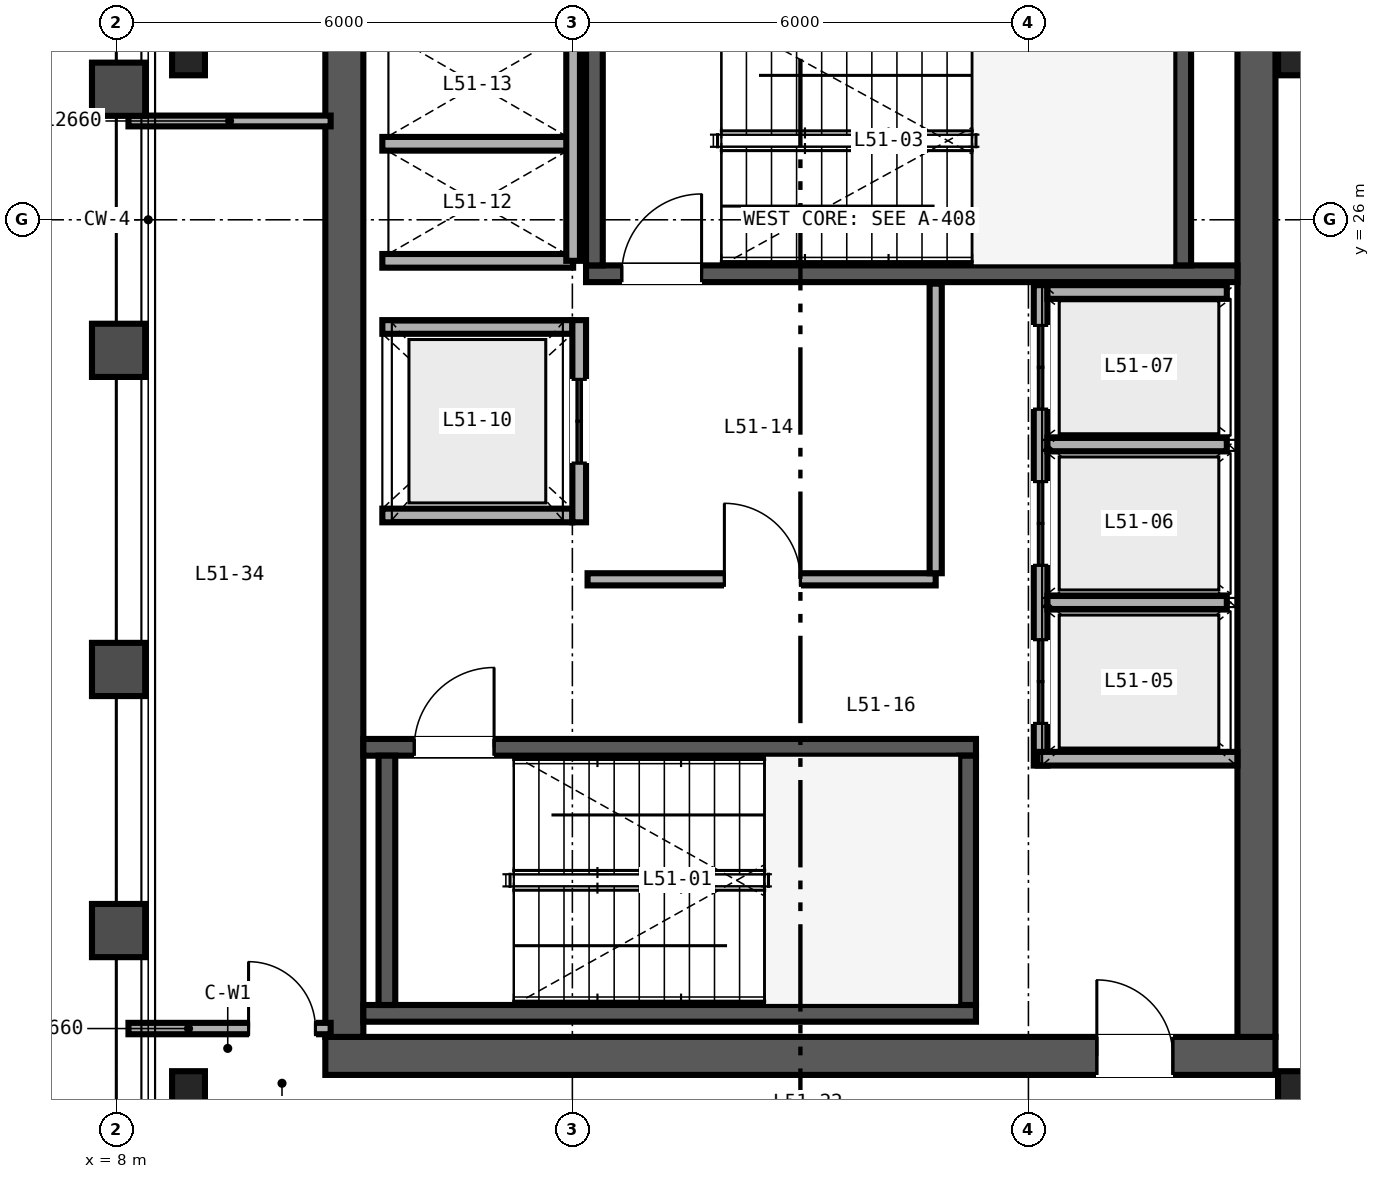
"""IFC4 building model, lengths in metres.
Left out: names, types, materials, properties, quantities, classifications, styles, units other than length and angle.
Written with IfcOpenShell. Run it as: python <this file> out.ifc"""

import sys

from ifc_helpers import new_model, si_unit, direction, frame, frame_2d, origin, origin_2d, place, context, subcontext, project, spatial, rectangle, i_section, extrude, source, transform, mapped, element, fill, save


model = new_model("IFC4")
c1 = context("Model", 3, precision=1e-05, world=origin(), true_north=direction((0.0, 1.0)))
c2 = subcontext(c1, "Body", "Model", "MODEL_VIEW")
j1 = project(units=[si_unit("LENGTHUNIT", "METRE"), si_unit("PLANEANGLEUNIT", "RADIAN")], contexts=[c1])
p1 = place(None, origin())
s1 = spatial("IfcSite", under=j1, at=p1, CompositionType="ELEMENT")
p2 = place(p1, origin())
s2 = spatial("IfcBuilding", under=s1, at=p2, CompositionType="ELEMENT")
p3 = place(p2, frame((0.0, 0.0, 202.8)))
s3 = spatial("IfcBuildingStorey", under=s2, at=p3, CompositionType="ELEMENT", Elevation=202.8)
p4 = place(p3, frame((10.75, 15.0, 0.0), z_axis=(0.0, 0.0, 1.0), x_axis=(1.0, 0.0, 0.0)))
e1 = element("IfcWall", 1, at=p4, inside=s3, PredefinedType="SHEAR", context=c2, shape_type="SweptSolid", body=[
    extrude(rectangle(XDim=12.5, YDim=0.5, at=frame_2d((6.25, 0.0))), origin(), (0.0, 0.0, 1.0), 3.37),
])
p5 = place(p4, frame((10.15, 0.0, 0.0)))
e2 = element("IfcOpeningElement", 2, at=p5, cuts=e1, PredefinedType="OPENING", context=c2, shape_type="SweptSolid", body=[
    extrude(rectangle(XDim=1.0, YDim=2.15, at=frame_2d((0.5, 1.075))), frame((0.0, 0.26, 0.0), z_axis=(0.0, -1.0, 0.0), x_axis=(1.0, 0.0, 0.0)), (0.0, 0.0, 1.0), 0.52),
])
for number, where, z_axis, x_axis in (
    (3, (11.0, 15.25, 0.0), (0.0, 0.0, 1.0), (0.0, 1.0, 0.0)),
    (4, (23.0, 15.25, 0.0), (0.0, 0.0, 1.0), (0.0, 1.0, 0.0)),
):
    element("IfcWall", number, at=place(p3, frame(where, z_axis=z_axis, x_axis=x_axis)), inside=s3, PredefinedType="SHEAR", context=c2, shape_type="SweptSolid", body=[
        extrude(rectangle(XDim=21.5, YDim=0.5, at=frame_2d((10.75, 0.0))), origin(), (0.0, 0.0, 1.0), 3.37),
    ])
p6 = place(p3, frame((11.25, 15.56, 0.0), z_axis=(0.0, 0.0, 1.0), x_axis=(1.0, 0.0, 0.0)))
e5 = element("IfcWall", 5, at=p6, inside=s3, PredefinedType="SHEAR", context=c2, shape_type="SweptSolid", body=[
    extrude(rectangle(XDim=8.06, YDim=0.22, at=frame_2d((4.03, 0.0))), origin(), (0.0, 0.0, 1.0), 3.4),
])
p7 = place(p3, frame((11.25, 19.06, 0.0), z_axis=(0.0, 0.0, 1.0), x_axis=(1.0, 0.0, 0.0)))
e6 = element("IfcWall", 6, at=p7, inside=s3, PredefinedType="SHEAR", context=c2, shape_type="SweptSolid", body=[
    extrude(rectangle(XDim=8.06, YDim=0.22, at=frame_2d((4.03, 0.0))), origin(), (0.0, 0.0, 1.0), 3.4),
])
p8 = place(p7, frame((0.67, 0.0, 0.0)))
e7 = element("IfcOpeningElement", 7, at=p8, cuts=e6, PredefinedType="OPENING", context=c2, shape_type="SweptSolid", body=[
    extrude(rectangle(XDim=1.05, YDim=2.15, at=frame_2d((0.525, 1.075))), frame((0.0, 0.12, 0.0), z_axis=(0.0, -1.0, 0.0), x_axis=(1.0, 0.0, 0.0)), (0.0, 0.0, 1.0), 0.24),
])
for number, where, z_axis, x_axis in (
    (8, (11.56, 15.67, 0.0), (0.0, 0.0, 1.0), (0.0, 1.0, 0.0)),
    (9, (19.2, 15.67, 0.0), (0.0, 0.0, 1.0), (0.0, 1.0, 0.0)),
):
    element("IfcWall", number, at=place(p3, frame(where, z_axis=z_axis, x_axis=x_axis)), inside=s3, PredefinedType="SHEAR", context=c2, shape_type="SweptSolid", body=[
        extrude(rectangle(XDim=3.28, YDim=0.22, at=frame_2d((1.64, 0.0))), origin(), (0.0, 0.0, 1.0), 3.4),
    ])
p9 = place(p3, frame((14.18, 25.29, 0.0), z_axis=(0.0, 0.0, 1.0), x_axis=(1.0, 0.0, 0.0)))
e10 = element("IfcWall", 10, at=p9, inside=s3, PredefinedType="SHEAR", context=c2, shape_type="SweptSolid", body=[
    extrude(rectangle(XDim=8.57, YDim=0.22, at=frame_2d((4.285, 0.0))), origin(), (0.0, 0.0, 1.0), 3.4),
])
p10 = place(p9, frame((0.47, 0.0, 0.0)))
e11 = element("IfcOpeningElement", 11, at=p10, cuts=e10, PredefinedType="OPENING", context=c2, shape_type="SweptSolid", body=[
    extrude(rectangle(XDim=1.05, YDim=2.15, at=frame_2d((0.525, 1.075))), frame((0.0, 0.12, 0.0), z_axis=(0.0, -1.0, 0.0), x_axis=(1.0, 0.0, 0.0)), (0.0, 0.0, 1.0), 0.24),
])
for number, where, z_axis, x_axis in (
    (12, (14.29, 25.4, 0.0), (0.0, 0.0, 1.0), (0.0, 1.0, 0.0)),
    (13, (22.03, 25.4, 0.0), (0.0, 0.0, 1.0), (0.0, 1.0, 0.0)),
):
    element("IfcWall", number, at=place(p3, frame(where, z_axis=z_axis, x_axis=x_axis)), inside=s3, PredefinedType="SHEAR", context=c2, shape_type="SweptSolid", body=[
        extrude(rectangle(XDim=3.28, YDim=0.22, at=frame_2d((1.64, 0.0))), origin(), (0.0, 0.0, 1.0), 3.4),
    ])
m1 = source(origin(), c2, "Body", "SweptSolid", [
    extrude(i_section(OverallWidth=0.432, OverallDepth=0.498, WebThickness=0.056, FlangeThickness=0.089, FilletRadius=0.025, at=origin_2d()), origin(), (0.0, 0.0, 1.0), 3.37),
])
for number, where, z_axis, x_axis in (
    (14, (8.95, 14.55, 0.0), (0.0, 0.0, 1.0), (1.0, 0.0, 0.0)),
    (15, (23.5, 14.55, 0.0), (0.0, 0.0, 1.0), (1.0, 0.0, 0.0)),
    (16, (8.95, 28.15, 0.0), (0.0, 0.0, 1.0), (1.0, 0.0, 0.0)),
    (17, (23.5, 28.15, 0.0), (0.0, 0.0, 1.0), (1.0, 0.0, 0.0)),
):
    element("IfcColumn", number, at=place(p3, frame(where, z_axis=z_axis, x_axis=x_axis)), inside=s3, PredefinedType="COLUMN", context=c2, shape_type="MappedRepresentation", body=[
        mapped(m1, transform((0.0, 0.0, 0.0), scale=1.0)),
    ])
p11 = place(p3, frame((20.16, 18.82, 0.0), z_axis=(0.0, 0.0, 1.0), x_axis=(0.0, 1.0, 0.0)))
e18 = element("IfcWall", 18, at=p11, inside=s3, PredefinedType="SOLIDWALL", context=c2, shape_type="SweptSolid", body=[
    extrude(rectangle(XDim=6.32, YDim=0.18, at=frame_2d((3.16, 0.0))), origin(), (0.0, 0.0, 1.0), 2.47),
])
p12 = place(p11, frame((0.555, 0.0, 0.0)))
e19 = element("IfcOpeningElement", 19, at=p12, cuts=e18, PredefinedType="OPENING", context=c2, shape_type="SweptSolid", body=[
    extrude(rectangle(XDim=1.1, YDim=2.2, at=frame_2d((0.55, 1.1))), frame((0.0, 0.1, 0.0), z_axis=(0.0, -1.0, 0.0), x_axis=(1.0, 0.0, 0.0)), (0.0, 0.0, 1.0), 0.2),
])
p13 = place(p11, frame((2.635, 0.0, 0.0)))
e20 = element("IfcOpeningElement", 20, at=p13, cuts=e18, PredefinedType="OPENING", context=c2, shape_type="SweptSolid", body=[
    extrude(rectangle(XDim=1.1, YDim=2.2, at=frame_2d((0.55, 1.1))), frame((0.0, 0.1, 0.0), z_axis=(0.0, -1.0, 0.0), x_axis=(1.0, 0.0, 0.0)), (0.0, 0.0, 1.0), 0.2),
])
p14 = place(p11, frame((4.69, 0.0, 0.0)))
e21 = element("IfcOpeningElement", 21, at=p14, cuts=e18, PredefinedType="OPENING", context=c2, shape_type="SweptSolid", body=[
    extrude(rectangle(XDim=1.1, YDim=2.2, at=frame_2d((0.55, 1.1))), frame((0.0, 0.1, 0.0), z_axis=(0.0, -1.0, 0.0), x_axis=(1.0, 0.0, 0.0)), (0.0, 0.0, 1.0), 0.2),
])
p15 = place(p3, frame((20.12, 18.91, 0.0), z_axis=(0.0, 0.0, 1.0), x_axis=(1.0, 0.0, 0.0)))
e22 = element("IfcWall", 22, at=p15, inside=s3, PredefinedType="SOLIDWALL", context=c2, shape_type="SweptSolid", body=[
    extrude(rectangle(XDim=2.63, YDim=0.18, at=frame_2d((1.315, 0.0))), origin(), (0.0, 0.0, 1.0), 3.37),
])
p16 = place(p3, frame((20.25, 25.05, 0.0), z_axis=(0.0, 0.0, 1.0), x_axis=(1.0, 0.0, 0.0)))
e23 = element("IfcWall", 23, at=p16, inside=s3, PredefinedType="SOLIDWALL", context=c2, shape_type="SweptSolid", body=[
    extrude(rectangle(XDim=2.36, YDim=0.18, at=frame_2d((1.18, 0.0))), origin(), (0.0, 0.0, 1.0), 3.37),
])
p17 = place(p3, frame((20.25, 20.965, 0.0), z_axis=(0.0, 0.0, 1.0), x_axis=(1.0, 0.0, 0.0)))
e24 = element("IfcWall", 24, at=p17, inside=s3, PredefinedType="SOLIDWALL", context=c2, shape_type="SweptSolid", body=[
    extrude(rectangle(XDim=2.36, YDim=0.18, at=frame_2d((1.18, 0.0))), origin(), (0.0, 0.0, 1.0), 2.47),
])
p18 = place(p3, frame((20.25, 23.045, 0.0), z_axis=(0.0, 0.0, 1.0), x_axis=(1.0, 0.0, 0.0)))
e25 = element("IfcWall", 25, at=p18, inside=s3, PredefinedType="SOLIDWALL", context=c2, shape_type="SweptSolid", body=[
    extrude(rectangle(XDim=2.36, YDim=0.18, at=frame_2d((1.18, 0.0))), origin(), (0.0, 0.0, 1.0), 3.37),
])
for number, where, z_axis, x_axis in (
    (26, (11.5, 22.11, 0.0), (0.0, 0.0, 1.0), (1.0, 0.0, 0.0)),
    (27, (11.5, 24.59, 0.0), (0.0, 0.0, 1.0), (1.0, 0.0, 0.0)),
):
    element("IfcWall", number, at=place(p3, frame(where, z_axis=z_axis, x_axis=x_axis)), inside=s3, PredefinedType="SOLIDWALL", context=c2, shape_type="SweptSolid", body=[
        extrude(rectangle(XDim=2.5, YDim=0.18, at=frame_2d((1.25, 0.0))), origin(), (0.0, 0.0, 1.0), 3.37),
    ])
p19 = place(p3, frame((14.09, 22.02, 0.0), z_axis=(0.0, 0.0, 1.0), x_axis=(0.0, 1.0, 0.0)))
e28 = element("IfcWall", 28, at=p19, inside=s3, PredefinedType="SOLIDWALL", context=c2, shape_type="SweptSolid", body=[
    extrude(rectangle(XDim=2.66, YDim=0.18, at=frame_2d((1.33, 0.0))), origin(), (0.0, 0.0, 1.0), 3.37),
])
p20 = place(p19, frame((0.78, 0.0, 0.0)))
e29 = element("IfcOpeningElement", 29, at=p20, cuts=e28, PredefinedType="OPENING", context=c2, shape_type="SweptSolid", body=[
    extrude(rectangle(XDim=1.1, YDim=2.2, at=frame_2d((0.55, 1.1))), frame((0.0, 0.1, 0.0), z_axis=(0.0, -1.0, 0.0), x_axis=(1.0, 0.0, 0.0)), (0.0, 0.0, 1.0), 0.2),
])
for number, where, z_axis, x_axis in (
    (30, (11.5, 25.46, 0.0), (0.0, 0.0, 1.0), (1.0, 0.0, 0.0)),
    (31, (11.5, 27.0, 0.0), (0.0, 0.0, 1.0), (1.0, 0.0, 0.0)),
):
    element("IfcWall", number, at=place(p3, frame(where, z_axis=z_axis, x_axis=x_axis)), inside=s3, PredefinedType="SOLIDWALL", context=c2, shape_type="SweptSolid", body=[
        extrude(rectangle(XDim=2.51, YDim=0.18, at=frame_2d((1.255, 0.0))), origin(), (0.0, 0.0, 1.0), 3.37),
    ])
p21 = place(p3, frame((14.01, 25.46, 0.0), z_axis=(0.0, 0.0, 1.0), x_axis=(0.0, 1.0, 0.0)))
e32 = element("IfcWall", 32, at=p21, inside=s3, PredefinedType="SOLIDWALL", context=c2, shape_type="SweptSolid", body=[
    extrude(rectangle(XDim=3.08, YDim=0.18, at=frame_2d((1.54, 0.0))), origin(), (0.0, 0.0, 1.0), 3.37),
])
p22 = place(p3, frame((14.2, 21.27, 0.0), z_axis=(0.0, 0.0, 1.0), x_axis=(1.0, 0.0, 0.0)))
e33 = element("IfcWall", 33, at=p22, inside=s3, PredefinedType="PARTITIONING", context=c2, shape_type="SweptSolid", body=[
    extrude(rectangle(XDim=4.58, YDim=0.16, at=frame_2d((2.29, 0.0))), origin(), (0.0, 0.0, 1.0), 3.37),
])
p23 = place(p22, frame((1.8, 0.0, 0.0)))
e34 = element("IfcOpeningElement", 34, at=p23, cuts=e33, PredefinedType="OPENING", context=c2, shape_type="SweptSolid", body=[
    extrude(rectangle(XDim=1.0, YDim=2.15, at=frame_2d((0.5, 1.075))), frame((0.0, 0.09, 0.0), z_axis=(0.0, -1.0, 0.0), x_axis=(1.0, 0.0, 0.0)), (0.0, 0.0, 1.0), 0.18),
])
p24 = place(p3, frame((18.78, 21.35, 0.0), z_axis=(0.0, 0.0, 1.0), x_axis=(0.0, 1.0, 0.0)))
e35 = element("IfcWall", 35, at=p24, inside=s3, PredefinedType="PARTITIONING", context=c2, shape_type="SweptSolid", body=[
    extrude(rectangle(XDim=3.81, YDim=0.16, at=frame_2d((1.905, 0.0))), origin(), (0.0, 0.0, 1.0), 3.37),
])
p25 = place(p3, frame((8.16, 15.36, 0.0), z_axis=(0.0, 0.0, 1.0), x_axis=(1.0, 0.0, 0.0)))
e36 = element("IfcWall", 36, at=p25, inside=s3, PredefinedType="PARTITIONING", context=c2, shape_type="SweptSolid", body=[
    extrude(rectangle(XDim=2.66, YDim=0.15, at=frame_2d((1.33, 0.0))), origin(), (0.0, 0.0, 1.0), 2.591),
])
p26 = place(p25, frame((1.58, 0.0, 0.0)))
e37 = element("IfcOpeningElement", 37, at=p26, cuts=e36, PredefinedType="OPENING", context=c2, shape_type="SweptSolid", body=[
    extrude(rectangle(XDim=0.88, YDim=2.15, at=frame_2d((0.44, 1.075))), frame((0.0, 0.085, 0.0), z_axis=(0.0, -1.0, 0.0), x_axis=(1.0, 0.0, 0.0)), (0.0, 0.0, 1.0), 0.17),
])
p27 = place(p3, frame((8.16, 27.3, 0.0), z_axis=(0.0, 0.0, 1.0), x_axis=(1.0, 0.0, 0.0)))
e38 = element("IfcWall", 38, at=p27, inside=s3, PredefinedType="PARTITIONING", context=c2, shape_type="SweptSolid", body=[
    extrude(rectangle(XDim=2.66, YDim=0.142, at=frame_2d((1.33, 0.0))), origin(), (0.0, 0.0, 1.0), 2.591),
])
m2 = source(origin(), c2, "Body", "SweptSolid", [
    extrude(rectangle(XDim=1.05, YDim=2.15, at=frame_2d((0.525, 1.075))), frame((0.0, 0.025, 0.0), z_axis=(0.0, -1.0, 0.0), x_axis=(1.0, 0.0, 0.0)), (0.0, 0.0, 1.0), 0.05),
])
p28 = place(p8, origin())
e39 = element("IfcDoor", 39, at=p28, inside=s3, OperationType="SINGLE_SWING_RIGHT", PredefinedType="DOOR", context=c2, shape_type="MappedRepresentation", body=[
    mapped(m2, transform((0.0, 0.0, 0.0), scale=1.0)),
])
fill(e7, e39)
p29 = place(p10, origin())
e40 = element("IfcDoor", 40, at=p29, inside=s3, OperationType="SINGLE_SWING_RIGHT", PredefinedType="DOOR", context=c2, shape_type="MappedRepresentation", body=[
    mapped(m2, transform((0.0, 0.0, 0.0), scale=1.0)),
])
fill(e11, e40)
m3 = source(origin(), c2, "Body", "SweptSolid", [
    extrude(rectangle(XDim=1.1, YDim=2.2, at=frame_2d((0.55, 1.1))), frame((0.0, 0.025, 0.0), z_axis=(0.0, -1.0, 0.0), x_axis=(1.0, 0.0, 0.0)), (0.0, 0.0, 1.0), 0.05),
])
p30 = place(p12, origin())
e41 = element("IfcDoor", 41, at=p30, inside=s3, OperationType="DOUBLE_DOOR_SLIDING", PredefinedType="DOOR", context=c2, shape_type="MappedRepresentation", body=[
    mapped(m3, transform((0.0, 0.0, 0.0), scale=1.0)),
])
fill(e19, e41)
p31 = place(p13, origin())
e42 = element("IfcDoor", 42, at=p31, inside=s3, OperationType="DOUBLE_DOOR_SLIDING", PredefinedType="DOOR", context=c2, shape_type="MappedRepresentation", body=[
    mapped(m3, transform((0.0, 0.0, 0.0), scale=1.0)),
])
fill(e20, e42)
p32 = place(p14, origin())
e43 = element("IfcDoor", 43, at=p32, inside=s3, OperationType="DOUBLE_DOOR_SLIDING", PredefinedType="DOOR", context=c2, shape_type="MappedRepresentation", body=[
    mapped(m3, transform((0.0, 0.0, 0.0), scale=1.0)),
])
fill(e21, e43)
p33 = place(p20, origin())
e44 = element("IfcDoor", 44, at=p33, inside=s3, OperationType="DOUBLE_DOOR_SLIDING", PredefinedType="DOOR", context=c2, shape_type="MappedRepresentation", body=[
    mapped(m3, transform((0.0, 0.0, 0.0), scale=1.0)),
])
fill(e29, e44)
m4 = source(origin(), c2, "Body", "SweptSolid", [
    extrude(rectangle(XDim=1.0, YDim=2.15, at=frame_2d((0.5, 1.075))), frame((0.0, 0.025, 0.0), z_axis=(0.0, -1.0, 0.0), x_axis=(1.0, 0.0, 0.0)), (0.0, 0.0, 1.0), 0.05),
])
p34 = place(p23, origin())
e45 = element("IfcDoor", 45, at=p34, inside=s3, OperationType="SINGLE_SWING_LEFT", PredefinedType="DOOR", context=c2, shape_type="MappedRepresentation", body=[
    mapped(m4, transform((0.0, 0.0, 0.0), scale=1.0)),
])
fill(e34, e45)
p35 = place(p5, origin())
e46 = element("IfcDoor", 46, at=p35, inside=s3, OperationType="SINGLE_SWING_LEFT", PredefinedType="DOOR", context=c2, shape_type="MappedRepresentation", body=[
    mapped(m4, transform((0.0, 0.0, 0.0), scale=1.0)),
])
fill(e2, e46)
m5 = source(origin(), c2, "Body", "SweptSolid", [
    extrude(rectangle(XDim=0.88, YDim=2.15, at=frame_2d((0.44, 1.075))), frame((0.0, 0.025, 0.0), z_axis=(0.0, -1.0, 0.0), x_axis=(1.0, 0.0, 0.0)), (0.0, 0.0, 1.0), 0.05),
])
p36 = place(p26, origin())
e47 = element("IfcDoor", 47, at=p36, inside=s3, OperationType="SINGLE_SWING_LEFT", PredefinedType="DOOR", context=c2, shape_type="MappedRepresentation", body=[
    mapped(m5, transform((0.0, 0.0, 0.0), scale=1.0)),
])
fill(e37, e47)
save(model, sys.argv[1])
